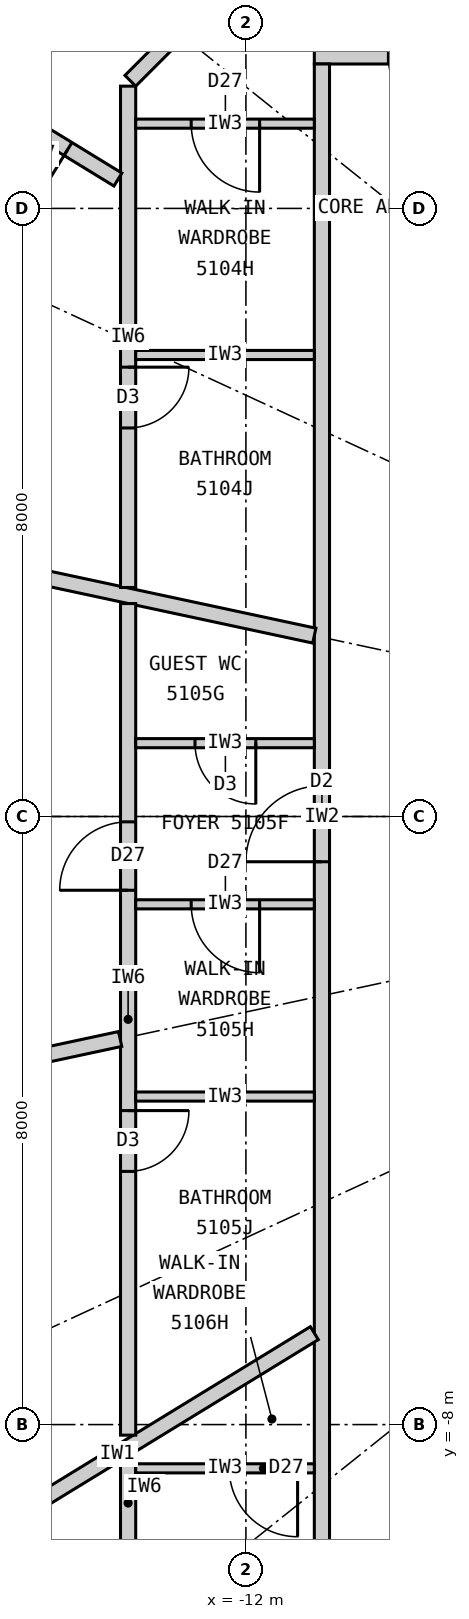
"""IFC4 building model, lengths in metres.
Left out: names, types, materials, properties, quantities, classifications, styles, units other than length and angle.
Written with IfcOpenShell. Run it as: python <this file> out.ifc"""

import sys

from ifc_helpers import new_model, si_unit, direction, frame, frame_2d, origin, place, context, subcontext, project, spatial, rectangle, extrude, element, fill, save


model = new_model("IFC4")
c1 = context("Model", 3, precision=1e-05, world=origin(), true_north=direction((0.0, 1.0)))
c2 = subcontext(c1, "Body", "Model", "MODEL_VIEW")
j1 = project(units=[si_unit("LENGTHUNIT", "METRE"), si_unit("PLANEANGLEUNIT", "RADIAN")], contexts=[c1])
p1 = place(None, origin())
s1 = spatial("IfcSite", under=j1, at=p1, CompositionType="ELEMENT")
p2 = place(p1, origin())
s2 = spatial("IfcBuilding", under=s1, at=p2, CompositionType="ELEMENT")
p3 = place(p2, frame((0.0, 0.0, 192.9)))
s3 = spatial("IfcBuildingStorey", under=s2, at=p3, CompositionType="ELEMENT", Elevation=192.9)
p4 = place(p3, frame((-11.1, 10.0, 0.0), z_axis=(0.0, 0.0, 1.0), x_axis=(1.0, 0.0, 0.0)))
e1 = element("IfcWall", 1, at=p4, inside=s3, PredefinedType="PARTITIONING", context=c2, shape_type="SweptSolid", body=[
    extrude(rectangle(XDim=22.2, YDim=0.2, at=frame_2d((11.1, 0.0))), origin(), (0.0, 0.0, 1.0), 3.12),
])
p5 = place(p4, frame((11.36, 0.0, 0.0)))
e2 = element("IfcOpeningElement", 2, at=p5, cuts=e1, PredefinedType="OPENING", context=c2, shape_type="SweptSolid", body=[
    extrude(rectangle(XDim=1.0, YDim=2.2, at=frame_2d((0.5, 1.1))), frame((0.0, 0.11, 0.0), z_axis=(0.0, -1.0, 0.0), x_axis=(1.0, 0.0, 0.0)), (0.0, 0.0, 1.0), 0.22),
])
p6 = place(p4, frame((0.975, 0.0, 0.0)))
e3 = element("IfcOpeningElement", 3, at=p6, cuts=e1, PredefinedType="OPENING", context=c2, shape_type="SweptSolid", body=[
    extrude(rectangle(XDim=1.0, YDim=2.2, at=frame_2d((0.5, 1.1))), frame((0.0, 0.11, 0.0), z_axis=(0.0, -1.0, 0.0), x_axis=(1.0, 0.0, 0.0)), (0.0, 0.0, 1.0), 0.22),
])
p7 = place(p3, frame((-11.0, 9.9, 0.0), z_axis=(0.0, 0.0, 1.0), x_axis=(0.0, -1.0, 0.0)))
e4 = element("IfcWall", 4, at=p7, inside=s3, PredefinedType="PARTITIONING", context=c2, shape_type="SweptSolid", body=[
    extrude(rectangle(XDim=19.8, YDim=0.2, at=frame_2d((9.9, 0.0))), origin(), (0.0, 0.0, 1.0), 3.12),
])
p8 = place(p7, frame((9.495, 0.0, 0.0)))
e5 = element("IfcOpeningElement", 5, at=p8, cuts=e4, PredefinedType="OPENING", context=c2, shape_type="SweptSolid", body=[
    extrude(rectangle(XDim=1.0, YDim=2.2, at=frame_2d((0.5, 1.1))), frame((0.0, 0.11, 0.0), z_axis=(0.0, -1.0, 0.0), x_axis=(1.0, 0.0, 0.0)), (0.0, 0.0, 1.0), 0.22),
])
p9 = place(p3, frame((-11.1, 2.379, 0.0), z_axis=(0.0, 0.0, 1.0), x_axis=(-0.977789888126, 0.209587534647, 0.0)))
e6 = element("IfcWall", 6, at=p9, inside=s3, PredefinedType="PARTITIONING", context=c2, shape_type="SweptSolid", body=[
    extrude(rectangle(XDim=8.273, YDim=0.2, at=frame_2d((4.136, 0.0))), origin(), (0.0, 0.0, 1.0), 2.27),
])
p10 = place(p3, frame((-11.1, -6.797, 0.0), z_axis=(0.0, 0.0, 1.0), x_axis=(-0.852799818179, -0.522237943963, 0.0)))
e7 = element("IfcWall", 7, at=p10, inside=s3, PredefinedType="PARTITIONING", context=c2, shape_type="SweptSolid", body=[
    extrude(rectangle(XDim=6.077, YDim=0.2, at=frame_2d((3.039, 0.0))), origin(), (0.0, 0.0, 1.0), 3.12),
])
p11 = place(p3, frame((-10.679, 12.521, 0.0), z_axis=(0.0, 0.0, 1.0), x_axis=(-0.707106781187, -0.707106781187, 0.0)))
e8 = element("IfcWall", 8, at=p11, inside=s3, PredefinedType="PARTITIONING", context=c2, shape_type="SweptSolid", body=[
    extrude(rectangle(XDim=4.019, YDim=0.2, at=frame_2d((2.009, 0.0))), origin(), (0.0, 0.0, 1.0), 3.12),
])
p12 = place(p3, frame((-13.55, 9.609, 0.0), z_axis=(0.0, 0.0, 1.0), x_axis=(0.0, -1.0, 0.0)))
e9 = element("IfcWall", 9, at=p12, inside=s3, PredefinedType="PARTITIONING", context=c2, shape_type="SweptSolid", body=[
    extrude(rectangle(XDim=6.596, YDim=0.2, at=frame_2d((3.298, 0.0))), origin(), (0.0, 0.0, 1.0), 3.12),
])
p13 = place(p12, frame((3.697, 0.0, 0.0)))
e10 = element("IfcOpeningElement", 10, at=p13, cuts=e9, PredefinedType="OPENING", context=c2, shape_type="SweptSolid", body=[
    extrude(rectangle(XDim=0.8, YDim=2.1, at=frame_2d((0.4, 1.05))), frame((0.0, 0.11, 0.0), z_axis=(0.0, -1.0, 0.0), x_axis=(1.0, 0.0, 0.0)), (0.0, 0.0, 1.0), 0.22),
])
p14 = place(p3, frame((-13.684, 8.38, 0.0), z_axis=(0.0, 0.0, 1.0), x_axis=(-0.852784302627, 0.522263279576, 0.0)))
e11 = element("IfcWall", 11, at=p14, inside=s3, PredefinedType="PARTITIONING", context=c2, shape_type="SweptSolid", body=[
    extrude(rectangle(XDim=3.047, YDim=0.2, at=frame_2d((1.523, 0.0))), origin(), (0.0, 0.0, 1.0), 3.12),
])
p15 = place(p14, frame((0.77, 0.0, 0.0)))
e12 = element("IfcOpeningElement", 12, at=p15, cuts=e11, PredefinedType="OPENING", context=c2, shape_type="SweptSolid", body=[
    extrude(rectangle(XDim=0.9, YDim=2.1, at=frame_2d((0.45, 1.05))), frame((0.0, 0.11, 0.0), z_axis=(0.0, -1.0, 0.0), x_axis=(1.0, 0.0, 0.0)), (0.0, 0.0, 1.0), 0.22),
])
p16 = place(p3, frame((-11.1, 9.115, 0.0), z_axis=(0.0, 0.0, 1.0), x_axis=(-1.0, 0.0, 0.0)))
e13 = element("IfcWall", 13, at=p16, inside=s3, PredefinedType="PARTITIONING", context=c2, shape_type="SweptSolid", body=[
    extrude(rectangle(XDim=2.35, YDim=0.12, at=frame_2d((1.175, 0.0))), origin(), (0.0, 0.0, 1.0), 3.12),
])
p17 = place(p16, frame((0.72, 0.0, 0.0)))
e14 = element("IfcOpeningElement", 14, at=p17, cuts=e13, PredefinedType="OPENING", context=c2, shape_type="SweptSolid", body=[
    extrude(rectangle(XDim=0.9, YDim=2.1, at=frame_2d((0.45, 1.05))), frame((0.0, 0.07, 0.0), z_axis=(0.0, -1.0, 0.0), x_axis=(1.0, 0.0, 0.0)), (0.0, 0.0, 1.0), 0.14),
])
p18 = place(p3, frame((-11.1, 6.072, 0.0), z_axis=(0.0, 0.0, 1.0), x_axis=(-1.0, 0.0, 0.0)))
e15 = element("IfcWall", 15, at=p18, inside=s3, PredefinedType="PARTITIONING", context=c2, shape_type="SweptSolid", body=[
    extrude(rectangle(XDim=2.35, YDim=0.12, at=frame_2d((1.175, 0.0))), origin(), (0.0, 0.0, 1.0), 3.12),
])
p19 = place(p3, frame((-13.55, 2.801, 0.0), z_axis=(0.0, 0.0, 1.0), x_axis=(0.0, -1.0, 0.0)))
e16 = element("IfcWall", 16, at=p19, inside=s3, PredefinedType="PARTITIONING", context=c2, shape_type="SweptSolid", body=[
    extrude(rectangle(XDim=10.94, YDim=0.2, at=frame_2d((5.47, 0.0))), origin(), (0.0, 0.0, 1.0), 3.12),
])
p20 = place(p19, frame((6.67, 0.0, 0.0)))
e17 = element("IfcOpeningElement", 17, at=p20, cuts=e16, PredefinedType="OPENING", context=c2, shape_type="SweptSolid", body=[
    extrude(rectangle(XDim=0.8, YDim=2.1, at=frame_2d((0.4, 1.05))), frame((0.0, 0.11, 0.0), z_axis=(0.0, -1.0, 0.0), x_axis=(1.0, 0.0, 0.0)), (0.0, 0.0, 1.0), 0.22),
])
p21 = place(p19, frame((2.872, 0.0, 0.0)))
e18 = element("IfcOpeningElement", 18, at=p21, cuts=e16, PredefinedType="OPENING", context=c2, shape_type="SweptSolid", body=[
    extrude(rectangle(XDim=0.9, YDim=2.1, at=frame_2d((0.45, 1.05))), frame((0.0, 0.11, 0.0), z_axis=(0.0, -1.0, 0.0), x_axis=(1.0, 0.0, 0.0)), (0.0, 0.0, 1.0), 0.22),
])
p22 = place(p3, frame((-13.655, -2.927, 0.0), z_axis=(0.0, 0.0, 1.0), x_axis=(-0.977790419294, -0.209585056568, 0.0)))
e19 = element("IfcWall", 19, at=p22, inside=s3, PredefinedType="PARTITIONING", context=c2, shape_type="SweptSolid", body=[
    extrude(rectangle(XDim=5.66, YDim=0.2, at=frame_2d((2.83, 0.0))), origin(), (0.0, 0.0, 1.0), 2.27),
])
p23 = place(p22, frame((1.82, 0.0, 0.0)))
e20 = element("IfcOpeningElement", 20, at=p23, cuts=e19, PredefinedType="OPENING", context=c2, shape_type="SweptSolid", body=[
    extrude(rectangle(XDim=0.9, YDim=2.1, at=frame_2d((0.45, 1.05))), frame((0.0, 0.11, 0.0), z_axis=(0.0, -1.0, 0.0), x_axis=(1.0, 0.0, 0.0)), (0.0, 0.0, 1.0), 0.22),
])
p24 = place(p3, frame((-11.1, 0.965, 0.0), z_axis=(0.0, 0.0, 1.0), x_axis=(-1.0, 0.0, 0.0)))
e21 = element("IfcWall", 21, at=p24, inside=s3, PredefinedType="PARTITIONING", context=c2, shape_type="SweptSolid", body=[
    extrude(rectangle(XDim=2.35, YDim=0.12, at=frame_2d((1.175, 0.0))), origin(), (0.0, 0.0, 1.0), 3.12),
])
p25 = place(p24, frame((0.77, 0.0, 0.0)))
e22 = element("IfcOpeningElement", 22, at=p25, cuts=e21, PredefinedType="OPENING", context=c2, shape_type="SweptSolid", body=[
    extrude(rectangle(XDim=0.8, YDim=2.1, at=frame_2d((0.4, 1.05))), frame((0.0, 0.07, 0.0), z_axis=(0.0, -1.0, 0.0), x_axis=(1.0, 0.0, 0.0)), (0.0, 0.0, 1.0), 0.14),
])
p26 = place(p3, frame((-11.1, -1.155, 0.0), z_axis=(0.0, 0.0, 1.0), x_axis=(-1.0, 0.0, 0.0)))
e23 = element("IfcWall", 23, at=p26, inside=s3, PredefinedType="PARTITIONING", context=c2, shape_type="SweptSolid", body=[
    extrude(rectangle(XDim=2.35, YDim=0.12, at=frame_2d((1.175, 0.0))), origin(), (0.0, 0.0, 1.0), 3.12),
])
p27 = place(p26, frame((0.72, 0.0, 0.0)))
e24 = element("IfcOpeningElement", 24, at=p27, cuts=e23, PredefinedType="OPENING", context=c2, shape_type="SweptSolid", body=[
    extrude(rectangle(XDim=0.9, YDim=2.1, at=frame_2d((0.45, 1.05))), frame((0.0, 0.07, 0.0), z_axis=(0.0, -1.0, 0.0), x_axis=(1.0, 0.0, 0.0)), (0.0, 0.0, 1.0), 0.14),
])
p28 = place(p3, frame((-11.1, -3.684, 0.0), z_axis=(0.0, 0.0, 1.0), x_axis=(-1.0, 0.0, 0.0)))
e25 = element("IfcWall", 25, at=p28, inside=s3, PredefinedType="PARTITIONING", context=c2, shape_type="SweptSolid", body=[
    extrude(rectangle(XDim=2.35, YDim=0.12, at=frame_2d((1.175, 0.0))), origin(), (0.0, 0.0, 1.0), 3.12),
])
p29 = place(p3, frame((-13.55, -8.456, 0.0), z_axis=(0.0, 0.0, 1.0), x_axis=(0.0, -1.0, 0.0)))
e26 = element("IfcWall", 26, at=p29, inside=s3, PredefinedType="PARTITIONING", context=c2, shape_type="SweptSolid", body=[
    extrude(rectangle(XDim=1.153, YDim=0.2, at=frame_2d((0.576, 0.0))), origin(), (0.0, 0.0, 1.0), 3.12),
])
p30 = place(p3, frame((-11.1, -8.576, 0.0), z_axis=(0.0, 0.0, 1.0), x_axis=(-1.0, 0.0, 0.0)))
e27 = element("IfcWall", 27, at=p30, inside=s3, PredefinedType="PARTITIONING", context=c2, shape_type="SweptSolid", body=[
    extrude(rectangle(XDim=2.35, YDim=0.12, at=frame_2d((1.175, 0.0))), origin(), (0.0, 0.0, 1.0), 3.12),
])
p31 = place(p30, frame((0.22, 0.0, 0.0)))
e28 = element("IfcOpeningElement", 28, at=p31, cuts=e27, PredefinedType="OPENING", context=c2, shape_type="SweptSolid", body=[
    extrude(rectangle(XDim=0.9, YDim=2.1, at=frame_2d((0.45, 1.05))), frame((0.0, 0.07, 0.0), z_axis=(0.0, -1.0, 0.0), x_axis=(1.0, 0.0, 0.0)), (0.0, 0.0, 1.0), 0.14),
])
p32 = place(p6, origin())
e29 = element("IfcDoor", 29, at=p32, inside=s3, OperationType="SINGLE_SWING_RIGHT", PredefinedType="DOOR", context=c2, shape_type="SweptSolid", body=[
    extrude(rectangle(XDim=1.0, YDim=2.2, at=frame_2d((0.5, 1.1))), frame((0.0, 0.025, 0.0), z_axis=(0.0, -1.0, 0.0), x_axis=(1.0, 0.0, 0.0)), (0.0, 0.0, 1.0), 0.05),
])
fill(e3, e29)
p33 = place(p17, origin())
e30 = element("IfcDoor", 30, at=p33, inside=s3, OperationType="SINGLE_SWING_LEFT", PredefinedType="DOOR", context=c2, shape_type="SweptSolid", body=[
    extrude(rectangle(XDim=0.9, YDim=2.1, at=frame_2d((0.45, 1.05))), frame((0.0, 0.025, 0.0), z_axis=(0.0, -1.0, 0.0), x_axis=(1.0, 0.0, 0.0)), (0.0, 0.0, 1.0), 0.05),
])
fill(e14, e30)
p34 = place(p13, origin())
e31 = element("IfcDoor", 31, at=p34, inside=s3, OperationType="SINGLE_SWING_LEFT", PredefinedType="DOOR", context=c2, shape_type="SweptSolid", body=[
    extrude(rectangle(XDim=0.8, YDim=2.1, at=frame_2d((0.4, 1.05))), frame((0.0, 0.025, 0.0), z_axis=(0.0, -1.0, 0.0), x_axis=(1.0, 0.0, 0.0)), (0.0, 0.0, 1.0), 0.05),
])
fill(e10, e31)
p35 = place(p15, origin())
e32 = element("IfcDoor", 32, at=p35, inside=s3, OperationType="SINGLE_SWING_LEFT", PredefinedType="DOOR", context=c2, shape_type="SweptSolid", body=[
    extrude(rectangle(XDim=0.9, YDim=2.1, at=frame_2d((0.45, 1.05))), frame((0.0, 0.025, 0.0), z_axis=(0.0, -1.0, 0.0), x_axis=(1.0, 0.0, 0.0)), (0.0, 0.0, 1.0), 0.05),
])
fill(e12, e32)
p36 = place(p8, origin())
e33 = element("IfcDoor", 33, at=p36, inside=s3, OperationType="SINGLE_SWING_RIGHT", PredefinedType="DOOR", context=c2, shape_type="SweptSolid", body=[
    extrude(rectangle(XDim=1.0, YDim=2.2, at=frame_2d((0.5, 1.1))), frame((0.0, 0.025, 0.0), z_axis=(0.0, -1.0, 0.0), x_axis=(1.0, 0.0, 0.0)), (0.0, 0.0, 1.0), 0.05),
])
fill(e5, e33)
p37 = place(p25, origin())
e34 = element("IfcDoor", 34, at=p37, inside=s3, OperationType="SINGLE_SWING_LEFT", PredefinedType="DOOR", context=c2, shape_type="SweptSolid", body=[
    extrude(rectangle(XDim=0.8, YDim=2.1, at=frame_2d((0.4, 1.05))), frame((0.0, 0.025, 0.0), z_axis=(0.0, -1.0, 0.0), x_axis=(1.0, 0.0, 0.0)), (0.0, 0.0, 1.0), 0.05),
])
fill(e22, e34)
p38 = place(p27, origin())
e35 = element("IfcDoor", 35, at=p38, inside=s3, OperationType="SINGLE_SWING_LEFT", PredefinedType="DOOR", context=c2, shape_type="SweptSolid", body=[
    extrude(rectangle(XDim=0.9, YDim=2.1, at=frame_2d((0.45, 1.05))), frame((0.0, 0.025, 0.0), z_axis=(0.0, -1.0, 0.0), x_axis=(1.0, 0.0, 0.0)), (0.0, 0.0, 1.0), 0.05),
])
fill(e24, e35)
p39 = place(p20, origin())
e36 = element("IfcDoor", 36, at=p39, inside=s3, OperationType="SINGLE_SWING_LEFT", PredefinedType="DOOR", context=c2, shape_type="SweptSolid", body=[
    extrude(rectangle(XDim=0.8, YDim=2.1, at=frame_2d((0.4, 1.05))), frame((0.0, 0.025, 0.0), z_axis=(0.0, -1.0, 0.0), x_axis=(1.0, 0.0, 0.0)), (0.0, 0.0, 1.0), 0.05),
])
fill(e17, e36)
p40 = place(p21, origin())
e37 = element("IfcDoor", 37, at=p40, inside=s3, OperationType="SINGLE_SWING_RIGHT", PredefinedType="DOOR", context=c2, shape_type="SweptSolid", body=[
    extrude(rectangle(XDim=0.9, YDim=2.1, at=frame_2d((0.45, 1.05))), frame((0.0, 0.025, 0.0), z_axis=(0.0, -1.0, 0.0), x_axis=(1.0, 0.0, 0.0)), (0.0, 0.0, 1.0), 0.05),
])
fill(e18, e37)
p41 = place(p31, origin())
e38 = element("IfcDoor", 38, at=p41, inside=s3, OperationType="SINGLE_SWING_LEFT", PredefinedType="DOOR", context=c2, shape_type="SweptSolid", body=[
    extrude(rectangle(XDim=0.9, YDim=2.1, at=frame_2d((0.45, 1.05))), frame((0.0, 0.025, 0.0), z_axis=(0.0, -1.0, 0.0), x_axis=(1.0, 0.0, 0.0)), (0.0, 0.0, 1.0), 0.05),
])
fill(e28, e38)
save(model, sys.argv[1])
